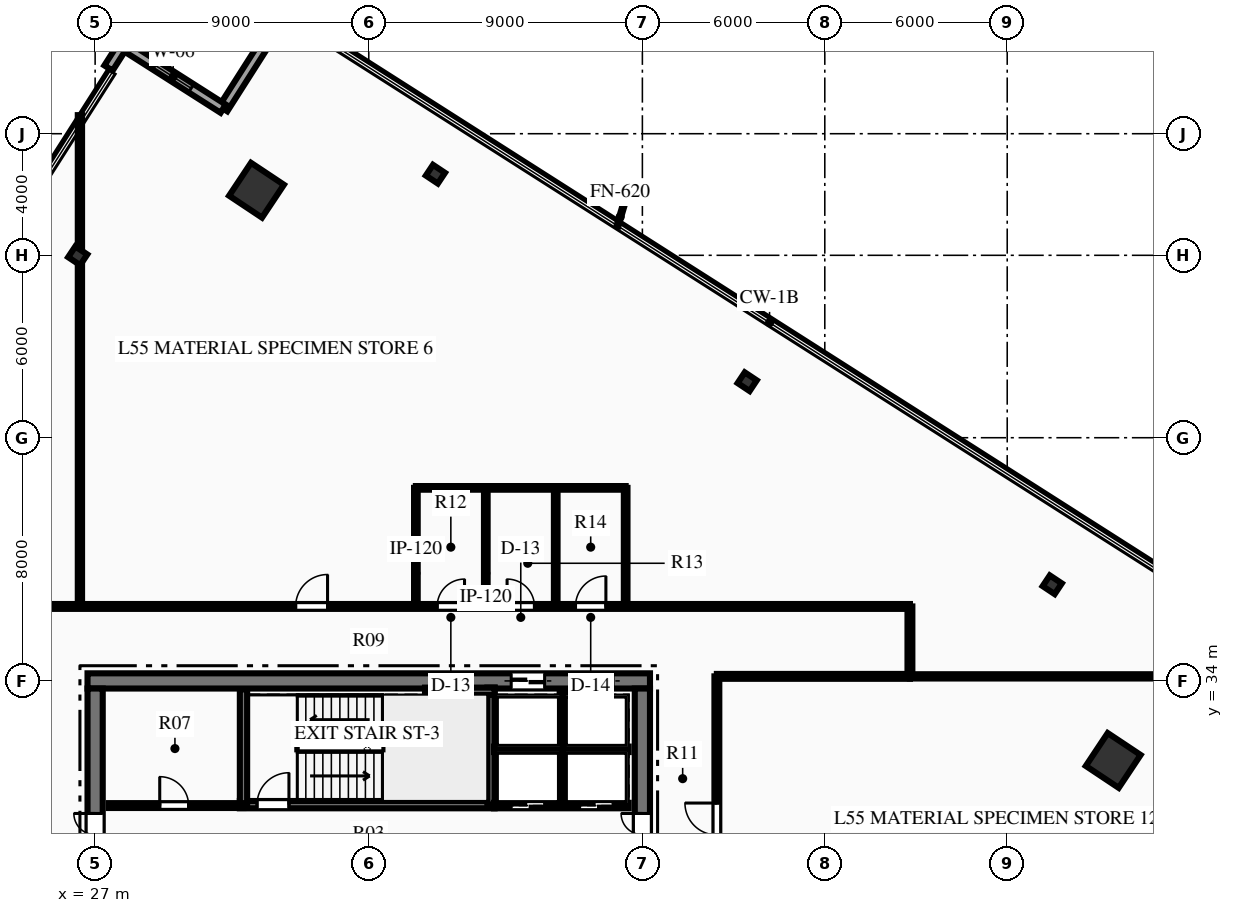
"""IFC4 building model, lengths in metres.
Left out: names, types, materials, properties, quantities, classifications, styles, units other than length and angle.
Written with IfcOpenShell. Run it as: python <this file> out.ifc"""

import sys

from ifc_helpers import new_model, si_unit, direction, frame, frame_2d, origin, origin_2d, place, context, subcontext, project, spatial, rectangle, hollow_rectangle, i_section, extrude, element, fill, save


model = new_model("IFC4")
c1 = context("Model", 3, precision=1e-05, world=origin(), true_north=direction((0.0, 1.0)))
c2 = subcontext(c1, "Body", "Model", "MODEL_VIEW")
j1 = project(units=[si_unit("LENGTHUNIT", "METRE"), si_unit("PLANEANGLEUNIT", "RADIAN")], contexts=[c1])
p1 = place(None, origin())
s1 = spatial("IfcSite", under=j1, at=p1, CompositionType="ELEMENT")
p2 = place(p1, origin())
s2 = spatial("IfcBuilding", under=s1, at=p2, CompositionType="ELEMENT")
p3 = place(p2, frame((0.0, 0.0, 220.95)))
s3 = spatial("IfcBuildingStorey", under=s2, at=p3, CompositionType="ELEMENT", Elevation=220.95)
p4 = place(p3, frame((26.75, 34.0, 0.0), z_axis=(0.0, 0.0, 1.0), x_axis=(1.0, 0.0, 0.0)))
e1 = element("IfcWall", 1, at=p4, inside=s3, PredefinedType="SHEAR", context=c2, shape_type="SweptSolid", body=[
    extrude(rectangle(XDim=18.5, YDim=0.5, at=frame_2d((9.25, 0.0))), origin(), (0.0, 0.0, 1.0), 3.75),
])
p5 = place(p4, frame((13.935, 0.0, 0.0)))
e2 = element("IfcOpeningElement", 2, at=p5, cuts=e1, PredefinedType="OPENING", context=c2, shape_type="SweptSolid", body=[
    extrude(rectangle(XDim=1.1, YDim=2.15, at=frame_2d((0.55, 1.075))), frame((0.0, 0.26, 0.0), z_axis=(0.0, -1.0, 0.0), x_axis=(1.0, 0.0, 0.0)), (0.0, 0.0, 1.0), 0.52),
])
p6 = place(p4, frame((16.185, 0.0, 0.0)))
e3 = element("IfcOpeningElement", 3, at=p6, cuts=e1, PredefinedType="OPENING", context=c2, shape_type="SweptSolid", body=[
    extrude(rectangle(XDim=1.1, YDim=2.15, at=frame_2d((0.55, 1.075))), frame((0.0, 0.26, 0.0), z_axis=(0.0, -1.0, 0.0), x_axis=(1.0, 0.0, 0.0)), (0.0, 0.0, 1.0), 0.52),
])
p7 = place(p3, frame((27.0, 18.25, 0.0), z_axis=(0.0, 0.0, 1.0), x_axis=(0.0, 1.0, 0.0)))
e4 = element("IfcWall", 4, at=p7, inside=s3, PredefinedType="SHEAR", context=c2, shape_type="SweptSolid", body=[
    extrude(rectangle(XDim=15.5, YDim=0.5, at=frame_2d((7.75, 0.0))), origin(), (0.0, 0.0, 1.0), 3.75),
])
p8 = place(p7, frame((9.99, 0.0, 0.0)))
e5 = element("IfcOpeningElement", 5, at=p8, cuts=e4, PredefinedType="OPENING", context=c2, shape_type="SweptSolid", body=[
    extrude(rectangle(XDim=1.4, YDim=2.2, at=frame_2d((0.7, 1.1))), frame((0.0, 0.26, 0.0), z_axis=(0.0, -1.0, 0.0), x_axis=(1.0, 0.0, 0.0)), (0.0, 0.0, 1.0), 0.52),
])
p9 = place(p3, frame((45.0, 18.25, 0.0), z_axis=(0.0, 0.0, 1.0), x_axis=(0.0, 1.0, 0.0)))
e6 = element("IfcWall", 6, at=p9, inside=s3, PredefinedType="SHEAR", context=c2, shape_type="SweptSolid", body=[
    extrude(rectangle(XDim=15.5, YDim=0.5, at=frame_2d((7.75, 0.0))), origin(), (0.0, 0.0, 1.0), 3.75),
])
p10 = place(p9, frame((9.99, 0.0, 0.0)))
e7 = element("IfcOpeningElement", 7, at=p10, cuts=e6, PredefinedType="OPENING", context=c2, shape_type="SweptSolid", body=[
    extrude(rectangle(XDim=1.4, YDim=2.2, at=frame_2d((0.7, 1.1))), frame((0.0, 0.26, 0.0), z_axis=(0.0, -1.0, 0.0), x_axis=(1.0, 0.0, 0.0)), (0.0, 0.0, 1.0), 0.52),
])
p11 = place(p3, frame((31.76, 29.93, 0.0), z_axis=(0.0, 0.0, 1.0), x_axis=(1.0, 0.0, 0.0)))
e8 = element("IfcWall", 8, at=p11, inside=s3, PredefinedType="SHEAR", context=c2, shape_type="SweptSolid", body=[
    extrude(rectangle(XDim=8.38, YDim=0.24, at=frame_2d((4.19, 0.0))), origin(), (0.0, 0.0, 1.0), 3.75),
])
p12 = place(p11, frame((0.565, 0.0, 0.0)))
e9 = element("IfcOpeningElement", 9, at=p12, cuts=e8, PredefinedType="OPENING", context=c2, shape_type="SweptSolid", body=[
    extrude(rectangle(XDim=1.05, YDim=2.15, at=frame_2d((0.525, 1.075))), frame((0.0, 0.13, 0.0), z_axis=(0.0, -1.0, 0.0), x_axis=(1.0, 0.0, 0.0)), (0.0, 0.0, 1.0), 0.26),
])
p13 = place(p3, frame((31.88, 29.93, 0.0), z_axis=(0.0, 0.0, 1.0), x_axis=(0.0, 1.0, 0.0)))
e10 = element("IfcWall", 10, at=p13, inside=s3, PredefinedType="SHEAR", context=c2, shape_type="SweptSolid", body=[
    extrude(rectangle(XDim=3.79, YDim=0.24, at=frame_2d((1.895, 0.0))), origin(), (0.0, 0.0, 1.0), 3.75),
])
p14 = place(p3, frame((40.02, 29.93, 0.0), z_axis=(0.0, 0.0, 1.0), x_axis=(0.0, 1.0, 0.0)))
e11 = element("IfcWall", 11, at=p14, inside=s3, PredefinedType="SHEAR", context=c2, shape_type="SweptSolid", body=[
    extrude(rectangle(XDim=3.85, YDim=0.24, at=frame_2d((1.925, 0.0))), origin(), (0.0, 0.0, 1.0), 3.75),
])
p15 = place(p3, frame((37.85, 33.66, 0.0), z_axis=(0.0, 0.0, 1.0), x_axis=(1.0, 0.0, 0.0)))
e12 = element("IfcWall", 12, at=p15, inside=s3, PredefinedType="SHEAR", context=c2, shape_type="SweptSolid", body=[
    extrude(rectangle(XDim=2.29, YDim=0.24, at=frame_2d((1.145, 0.0))), origin(), (0.0, 0.0, 1.0), 3.75),
])
for number, where, z_axis, x_axis in (
    (13, (60.486, 31.384, 0.0), (0.0, 0.0, 1.0), (0.554, 0.832, 0.0)),
    (14, (32.308, 50.141, 0.0), (0.0, 0.0, 1.0), (0.554, 0.832, 0.0)),
):
    element("IfcColumn", number, at=place(p3, frame(where, z_axis=z_axis, x_axis=x_axis)), inside=s3, PredefinedType="COLUMN", context=c2, shape_type="SweptSolid", body=[
        extrude(hollow_rectangle(XDim=1.3, YDim=1.3, WallThickness=0.06, at=origin_2d()), origin(), (0.0, 0.0, 1.0), 3.75),
    ])
for number, where, z_axis, x_axis in (
    (15, (58.481, 37.164, 0.0), (0.0, 0.0, 1.0), (0.554, 0.832, 0.0)),
    (16, (48.448, 43.842, 0.0), (0.0, 0.0, 1.0), (0.554, 0.832, 0.0)),
    (17, (38.193, 50.668, 0.0), (0.0, 0.0, 1.0), (0.554, 0.832, 0.0)),
    (18, (26.428, 47.984, 0.0), (0.0, 0.0, 1.0), (0.554, 0.832, 0.0)),
):
    element("IfcColumn", number, at=place(p3, frame(where, z_axis=z_axis, x_axis=x_axis)), inside=s3, PredefinedType="COLUMN", context=c2, shape_type="SweptSolid", body=[
        extrude(i_section(OverallWidth=0.424, OverallDepth=0.474, WebThickness=0.048, FlangeThickness=0.077, at=origin_2d()), origin(), (0.0, 0.0, 1.0), 3.75),
    ])
p16 = place(p3, frame((31.212, 52.823, 0.0), z_axis=(0.0, 0.0, 1.0), x_axis=(0.537316950166, 0.843380397605, 0.0)))
e19 = element("IfcWall", 19, at=p16, inside=s3, PredefinedType="STANDARD", context=c2, shape_type="SweptSolid", body=[
    extrude(rectangle(XDim=3.9, YDim=0.32, at=frame_2d((1.95, 0.0))), origin(), (0.0, 0.0, 1.0), 3.47),
])
p17 = place(p3, frame((27.923, 54.919, 0.0), z_axis=(0.0, 0.0, 1.0), x_axis=(0.8433984701, -0.537288582266, 0.0)))
e20 = element("IfcWall", 20, at=p17, inside=s3, PredefinedType="STANDARD", context=c2, shape_type="SweptSolid", body=[
    extrude(rectangle(XDim=3.9, YDim=0.32, at=frame_2d((1.95, 0.0))), origin(), (0.0, 0.0, 1.0), 3.47),
])
p18 = place(p17, frame((1.25, 0.0, 0.85)))
e21 = element("IfcOpeningElement", 21, at=p18, cuts=e20, PredefinedType="OPENING", context=c2, shape_type="SweptSolid", body=[
    extrude(rectangle(XDim=1.4, YDim=2.0, at=frame_2d((0.7, 1.0))), frame((0.0, 0.17, 0.0), z_axis=(0.0, -1.0, 0.0), x_axis=(1.0, 0.0, 0.0)), (0.0, 0.0, 1.0), 0.34),
])
p19 = place(p3, frame((27.439, 54.159, 0.0), z_axis=(0.0, 0.0, 1.0), x_axis=(0.53724395169, 0.843426900432, 0.0)))
e22 = element("IfcWall", 22, at=p19, inside=s3, PredefinedType="STANDARD", context=c2, shape_type="SweptSolid", body=[
    extrude(rectangle(XDim=0.9, YDim=0.32, at=frame_2d((0.45, 0.0))), origin(), (0.0, 0.0, 1.0), 3.47),
])
p20 = place(p3, frame((27.45, 29.9, 0.0), z_axis=(0.0, 0.0, 1.0), x_axis=(1.0, 0.0, 0.0)))
e23 = element("IfcWall", 23, at=p20, inside=s3, PredefinedType="PARTITIONING", context=c2, shape_type="SweptSolid", body=[
    extrude(rectangle(XDim=4.43, YDim=0.16, at=frame_2d((2.215, 0.0))), origin(), (0.0, 0.0, 1.0), 3.47),
])
p21 = place(p20, frame((1.675, 0.0, 0.0)))
e24 = element("IfcOpeningElement", 24, at=p21, cuts=e23, PredefinedType="OPENING", context=c2, shape_type="SweptSolid", body=[
    extrude(rectangle(XDim=0.95, YDim=2.15, at=frame_2d((0.475, 1.075))), frame((0.0, 0.09, 0.0), z_axis=(0.0, -1.0, 0.0), x_axis=(1.0, 0.0, 0.0)), (0.0, 0.0, 1.0), 0.18),
])
p22 = place(p3, frame((40.12, 29.9, 0.0), z_axis=(0.0, 0.0, 1.0), x_axis=(1.0, 0.0, 0.0)))
e25 = element("IfcWall", 25, at=p22, inside=s3, PredefinedType="PARTITIONING", context=c2, shape_type="SweptSolid", body=[
    extrude(rectangle(XDim=4.43, YDim=0.18, at=frame_2d((2.215, 0.0))), origin(), (0.0, 0.0, 1.0), 3.47),
])
p23 = place(p22, frame((0.565, 0.0, 0.0)))
e26 = element("IfcOpeningElement", 26, at=p23, cuts=e25, PredefinedType="OPENING", context=c2, shape_type="SweptSolid", body=[
    extrude(rectangle(XDim=1.1, YDim=2.15, at=frame_2d((0.55, 1.075))), frame((0.0, 0.1, 0.0), z_axis=(0.0, -1.0, 0.0), x_axis=(1.0, 0.0, 0.0)), (0.0, 0.0, 1.0), 0.2),
])
p24 = place(p22, frame((2.815, 0.0, 0.0)))
e27 = element("IfcOpeningElement", 27, at=p24, cuts=e25, PredefinedType="OPENING", context=c2, shape_type="SweptSolid", body=[
    extrude(rectangle(XDim=1.1, YDim=2.15, at=frame_2d((0.55, 1.075))), frame((0.0, 0.1, 0.0), z_axis=(0.0, -1.0, 0.0), x_axis=(1.0, 0.0, 0.0)), (0.0, 0.0, 1.0), 0.2),
])
p25 = place(p3, frame((40.12, 31.75, 0.0), z_axis=(0.0, 0.0, 1.0), x_axis=(1.0, 0.0, 0.0)))
e28 = element("IfcWall", 28, at=p25, inside=s3, PredefinedType="PARTITIONING", context=c2, shape_type="SweptSolid", body=[
    extrude(rectangle(XDim=4.43, YDim=0.18, at=frame_2d((2.215, 0.0))), origin(), (0.0, 0.0, 1.0), 3.47),
])
p26 = place(p3, frame((42.37, 29.9, 0.0), z_axis=(0.0, 0.0, 1.0), x_axis=(0.0, 1.0, 0.0)))
e29 = element("IfcWall", 29, at=p26, inside=s3, PredefinedType="PARTITIONING", context=c2, shape_type="SweptSolid", body=[
    extrude(rectangle(XDim=3.75, YDim=0.18, at=frame_2d((1.875, 0.0))), origin(), (0.0, 0.0, 1.0), 3.47),
])
p27 = place(p3, frame((18.2, 36.45, 0.0), z_axis=(0.0, 0.0, 1.0), x_axis=(1.0, 0.0, 0.0)))
e30 = element("IfcWall", 30, at=p27, inside=s3, PredefinedType="PARTITIONING", context=c2, shape_type="SweptSolid", body=[
    extrude(rectangle(XDim=35.6, YDim=0.16, at=frame_2d((17.8, 0.0))), origin(), (0.0, 0.0, 1.0), 2.849),
])
p28 = place(p27, frame((20.05, 0.0, 0.0)))
e31 = element("IfcOpeningElement", 31, at=p28, cuts=e30, PredefinedType="OPENING", context=c2, shape_type="SweptSolid", body=[
    extrude(rectangle(XDim=0.9, YDim=2.15, at=frame_2d((0.45, 1.075))), frame((0.0, 0.09, 0.0), z_axis=(0.0, -1.0, 0.0), x_axis=(1.0, 0.0, 0.0)), (0.0, 0.0, 1.0), 0.18),
])
p29 = place(p27, frame((22.35, 0.0, 0.0)))
e32 = element("IfcOpeningElement", 32, at=p29, cuts=e30, PredefinedType="OPENING", context=c2, shape_type="SweptSolid", body=[
    extrude(rectangle(XDim=0.9, YDim=2.15, at=frame_2d((0.45, 1.075))), frame((0.0, 0.09, 0.0), z_axis=(0.0, -1.0, 0.0), x_axis=(1.0, 0.0, 0.0)), (0.0, 0.0, 1.0), 0.18),
])
p30 = place(p27, frame((24.6, 0.0, 0.0)))
e33 = element("IfcOpeningElement", 33, at=p30, cuts=e30, PredefinedType="OPENING", context=c2, shape_type="SweptSolid", body=[
    extrude(rectangle(XDim=1.0, YDim=2.15, at=frame_2d((0.5, 1.075))), frame((0.0, 0.09, 0.0), z_axis=(0.0, -1.0, 0.0), x_axis=(1.0, 0.0, 0.0)), (0.0, 0.0, 1.0), 0.18),
])
p31 = place(p27, frame((5.345, 0.0, 0.0)))
e34 = element("IfcOpeningElement", 34, at=p31, cuts=e30, PredefinedType="OPENING", context=c2, shape_type="SweptSolid", body=[
    extrude(rectangle(XDim=1.05, YDim=2.15, at=frame_2d((0.525, 1.075))), frame((0.0, 0.09, 0.0), z_axis=(0.0, -1.0, 0.0), x_axis=(1.0, 0.0, 0.0)), (0.0, 0.0, 1.0), 0.18),
])
p32 = place(p27, frame((15.395, 0.0, 0.0)))
e35 = element("IfcOpeningElement", 35, at=p32, cuts=e30, PredefinedType="OPENING", context=c2, shape_type="SweptSolid", body=[
    extrude(rectangle(XDim=1.05, YDim=2.15, at=frame_2d((0.525, 1.075))), frame((0.0, 0.09, 0.0), z_axis=(0.0, -1.0, 0.0), x_axis=(1.0, 0.0, 0.0)), (0.0, 0.0, 1.0), 0.18),
])
p33 = place(p3, frame((47.45, 34.15, 0.0), z_axis=(0.0, 0.0, 1.0), x_axis=(1.0, 0.0, 0.0)))
e36 = element("IfcWall", 36, at=p33, inside=s3, PredefinedType="PARTITIONING", context=c2, shape_type="SweptSolid", body=[
    extrude(rectangle(XDim=6.35, YDim=0.16, at=frame_2d((3.175, 0.0))), origin(), (0.0, 0.0, 1.0), 3.47),
])
p34 = place(p3, frame((47.45, 27.25, 0.0), z_axis=(0.0, 0.0, 1.0), x_axis=(0.0, 1.0, 0.0)))
e37 = element("IfcWall", 37, at=p34, inside=s3, PredefinedType="PARTITIONING", context=c2, shape_type="SweptSolid", body=[
    extrude(rectangle(XDim=6.9, YDim=0.16, at=frame_2d((3.45, 0.0))), origin(), (0.0, 0.0, 1.0), 3.47),
])
p35 = place(p34, frame((1.683, 0.0, 0.0)))
e38 = element("IfcOpeningElement", 38, at=p35, cuts=e37, PredefinedType="OPENING", context=c2, shape_type="SweptSolid", body=[
    extrude(rectangle(XDim=1.05, YDim=2.15, at=frame_2d((0.525, 1.075))), frame((0.0, 0.09, 0.0), z_axis=(0.0, -1.0, 0.0), x_axis=(1.0, 0.0, 0.0)), (0.0, 0.0, 1.0), 0.18),
])
p36 = place(p3, frame((53.8, 34.15, 0.0), z_axis=(0.0, 0.0, 1.0), x_axis=(0.0, 1.0, 0.0)))
e39 = element("IfcWall", 39, at=p36, inside=s3, PredefinedType="PARTITIONING", context=c2, shape_type="SweptSolid", body=[
    extrude(rectangle(XDim=2.3, YDim=0.16, at=frame_2d((1.15, 0.0))), origin(), (0.0, 0.0, 1.0), 3.47),
])
for number, where, z_axis, x_axis in (
    (40, (37.55, 36.45, 0.0), (0.0, 0.0, 1.0), (0.0, 1.0, 0.0)),
    (41, (39.85, 36.45, 0.0), (0.0, 0.0, 1.0), (0.0, 1.0, 0.0)),
    (42, (42.15, 36.45, 0.0), (0.0, 0.0, 1.0), (0.0, 1.0, 0.0)),
    (43, (44.45, 36.45, 0.0), (0.0, 0.0, 1.0), (0.0, 1.0, 0.0)),
):
    element("IfcWall", number, at=place(p3, frame(where, z_axis=z_axis, x_axis=x_axis)), inside=s3, PredefinedType="PARTITIONING", context=c2, shape_type="SweptSolid", body=[
        extrude(rectangle(XDim=3.9, YDim=0.12, at=frame_2d((1.95, 0.0))), origin(), (0.0, 0.0, 1.0), 3.47),
    ])
p37 = place(p3, frame((37.55, 40.35, 0.0), z_axis=(0.0, 0.0, 1.0), x_axis=(1.0, 0.0, 0.0)))
e44 = element("IfcWall", 44, at=p37, inside=s3, PredefinedType="PARTITIONING", context=c2, shape_type="SweptSolid", body=[
    extrude(rectangle(XDim=6.9, YDim=0.12, at=frame_2d((3.45, 0.0))), origin(), (0.0, 0.0, 1.0), 3.47),
])
p38 = place(p3, frame((53.8, 34.15, 0.0), z_axis=(0.0, 0.0, 1.0), x_axis=(1.0, 0.0, 0.0)))
e45 = element("IfcWall", 45, at=p38, inside=s3, PredefinedType="PARTITIONING", context=c2, shape_type="SweptSolid", body=[
    extrude(rectangle(XDim=10.377, YDim=0.14, at=frame_2d((5.188, 0.0))), origin(), (0.0, 0.0, 1.0), 3.47),
])
p39 = place(p3, frame((26.5, 36.45, 0.0), z_axis=(0.0, 0.0, 1.0), x_axis=(0.0, 1.0, 0.0)))
e46 = element("IfcWall", 46, at=p39, inside=s3, PredefinedType="PARTITIONING", context=c2, shape_type="SweptSolid", body=[
    extrude(rectangle(XDim=16.16, YDim=0.14, at=frame_2d((8.08, 0.0))), origin(), (0.0, 0.0, 1.0), 3.008),
])
p40 = place(p18, origin())
e47 = element("IfcWindow", 47, at=p40, inside=s3, PartitioningType="SINGLE_PANEL", PredefinedType="WINDOW", context=c2, shape_type="SweptSolid", body=[
    extrude(rectangle(XDim=1.4, YDim=2.0, at=frame_2d((0.7, 1.0))), frame((0.0, 0.03, 0.0), z_axis=(0.0, -1.0, 0.0), x_axis=(1.0, 0.0, 0.0)), (0.0, 0.0, 1.0), 0.06),
])
fill(e21, e47)
p41 = place(p21, origin())
e48 = element("IfcDoor", 48, at=p41, inside=s3, OperationType="SINGLE_SWING_LEFT", PredefinedType="DOOR", context=c2, shape_type="SweptSolid", body=[
    extrude(rectangle(XDim=0.95, YDim=2.15, at=frame_2d((0.475, 1.075))), frame((0.0, 0.025, 0.0), z_axis=(0.0, -1.0, 0.0), x_axis=(1.0, 0.0, 0.0)), (0.0, 0.0, 1.0), 0.05),
])
fill(e24, e48)
p42 = place(p12, origin())
e49 = element("IfcDoor", 49, at=p42, inside=s3, OperationType="SINGLE_SWING_RIGHT", PredefinedType="DOOR", context=c2, shape_type="SweptSolid", body=[
    extrude(rectangle(XDim=1.05, YDim=2.15, at=frame_2d((0.525, 1.075))), frame((0.0, 0.025, 0.0), z_axis=(0.0, -1.0, 0.0), x_axis=(1.0, 0.0, 0.0)), (0.0, 0.0, 1.0), 0.05),
])
fill(e9, e49)
p43 = place(p8, origin())
e50 = element("IfcDoor", 50, at=p43, inside=s3, OperationType="DOUBLE_DOOR_SINGLE_SWING", PredefinedType="DOOR", context=c2, shape_type="SweptSolid", body=[
    extrude(rectangle(XDim=1.4, YDim=2.2, at=frame_2d((0.7, 1.1))), frame((0.0, 0.025, 0.0), z_axis=(0.0, -1.0, 0.0), x_axis=(1.0, 0.0, 0.0)), (0.0, 0.0, 1.0), 0.05),
])
fill(e5, e50)
p44 = place(p10, origin())
e51 = element("IfcDoor", 51, at=p44, inside=s3, OperationType="DOUBLE_DOOR_SINGLE_SWING", PredefinedType="DOOR", context=c2, shape_type="SweptSolid", body=[
    extrude(rectangle(XDim=1.4, YDim=2.2, at=frame_2d((0.7, 1.1))), frame((0.0, 0.025, 0.0), z_axis=(0.0, -1.0, 0.0), x_axis=(1.0, 0.0, 0.0)), (0.0, 0.0, 1.0), 0.05),
])
fill(e7, e51)
p45 = place(p28, origin())
e52 = element("IfcDoor", 52, at=p45, inside=s3, OperationType="SINGLE_SWING_RIGHT", PredefinedType="DOOR", context=c2, shape_type="SweptSolid", body=[
    extrude(rectangle(XDim=0.9, YDim=2.15, at=frame_2d((0.45, 1.075))), frame((0.0, 0.025, 0.0), z_axis=(0.0, -1.0, 0.0), x_axis=(1.0, 0.0, 0.0)), (0.0, 0.0, 1.0), 0.05),
])
fill(e31, e52)
p46 = place(p29, origin())
e53 = element("IfcDoor", 53, at=p46, inside=s3, OperationType="SINGLE_SWING_LEFT", PredefinedType="DOOR", context=c2, shape_type="SweptSolid", body=[
    extrude(rectangle(XDim=0.9, YDim=2.15, at=frame_2d((0.45, 1.075))), frame((0.0, 0.025, 0.0), z_axis=(0.0, -1.0, 0.0), x_axis=(1.0, 0.0, 0.0)), (0.0, 0.0, 1.0), 0.05),
])
fill(e32, e53)
p47 = place(p30, origin())
e54 = element("IfcDoor", 54, at=p47, inside=s3, OperationType="SINGLE_SWING_RIGHT", PredefinedType="DOOR", context=c2, shape_type="SweptSolid", body=[
    extrude(rectangle(XDim=1.0, YDim=2.15, at=frame_2d((0.5, 1.075))), frame((0.0, 0.025, 0.0), z_axis=(0.0, -1.0, 0.0), x_axis=(1.0, 0.0, 0.0)), (0.0, 0.0, 1.0), 0.05),
])
fill(e33, e54)
p48 = place(p32, origin())
e55 = element("IfcDoor", 55, at=p48, inside=s3, OperationType="SINGLE_SWING_RIGHT", PredefinedType="DOOR", context=c2, shape_type="SweptSolid", body=[
    extrude(rectangle(XDim=1.05, YDim=2.15, at=frame_2d((0.525, 1.075))), frame((0.0, 0.025, 0.0), z_axis=(0.0, -1.0, 0.0), x_axis=(1.0, 0.0, 0.0)), (0.0, 0.0, 1.0), 0.05),
])
fill(e35, e55)
p49 = place(p35, origin())
e56 = element("IfcDoor", 56, at=p49, inside=s3, OperationType="SINGLE_SWING_RIGHT", PredefinedType="DOOR", context=c2, shape_type="SweptSolid", body=[
    extrude(rectangle(XDim=1.05, YDim=2.15, at=frame_2d((0.525, 1.075))), frame((0.0, 0.025, 0.0), z_axis=(0.0, -1.0, 0.0), x_axis=(1.0, 0.0, 0.0)), (0.0, 0.0, 1.0), 0.05),
])
fill(e38, e56)
p50 = place(p23, origin())
e57 = element("IfcDoor", 57, at=p50, inside=s3, OperationType="SLIDING_TO_LEFT", PredefinedType="DOOR", context=c2, shape_type="SweptSolid", body=[
    extrude(rectangle(XDim=1.1, YDim=2.15, at=frame_2d((0.55, 1.075))), frame((0.0, 0.025, 0.0), z_axis=(0.0, -1.0, 0.0), x_axis=(1.0, 0.0, 0.0)), (0.0, 0.0, 1.0), 0.05),
])
fill(e26, e57)
p51 = place(p24, origin())
e58 = element("IfcDoor", 58, at=p51, inside=s3, OperationType="SLIDING_TO_LEFT", PredefinedType="DOOR", context=c2, shape_type="SweptSolid", body=[
    extrude(rectangle(XDim=1.1, YDim=2.15, at=frame_2d((0.55, 1.075))), frame((0.0, 0.025, 0.0), z_axis=(0.0, -1.0, 0.0), x_axis=(1.0, 0.0, 0.0)), (0.0, 0.0, 1.0), 0.05),
])
fill(e27, e58)
p52 = place(p5, origin())
e59 = element("IfcDoor", 59, at=p52, inside=s3, OperationType="SLIDING_TO_LEFT", PredefinedType="DOOR", context=c2, shape_type="SweptSolid", body=[
    extrude(rectangle(XDim=1.1, YDim=2.15, at=frame_2d((0.55, 1.075))), frame((0.0, 0.025, 0.0), z_axis=(0.0, -1.0, 0.0), x_axis=(1.0, 0.0, 0.0)), (0.0, 0.0, 1.0), 0.05),
])
fill(e2, e59)
p53 = place(p6, origin())
e60 = element("IfcDoor", 60, at=p53, inside=s3, OperationType="SLIDING_TO_LEFT", PredefinedType="DOOR", context=c2, shape_type="SweptSolid", body=[
    extrude(rectangle(XDim=1.1, YDim=2.15, at=frame_2d((0.55, 1.075))), frame((0.0, 0.025, 0.0), z_axis=(0.0, -1.0, 0.0), x_axis=(1.0, 0.0, 0.0)), (0.0, 0.0, 1.0), 0.05),
])
fill(e3, e60)
save(model, sys.argv[1])
